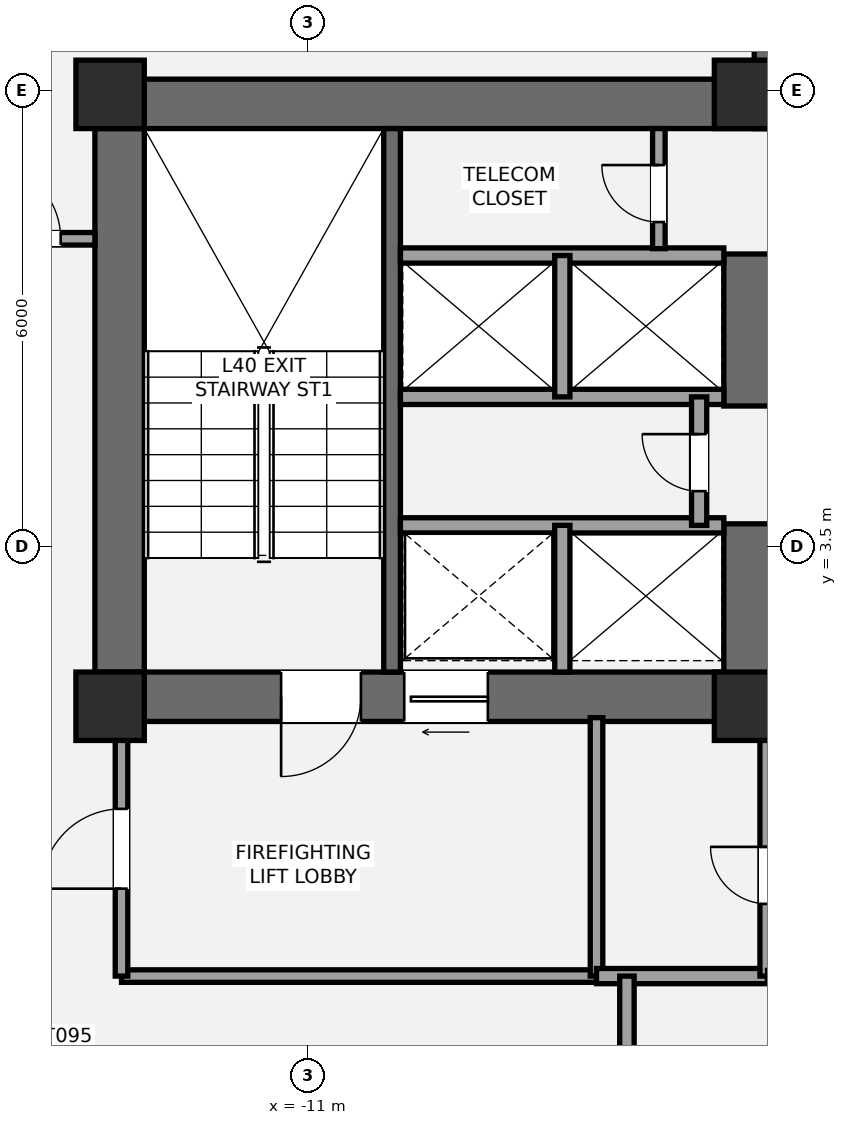
"""IFC4 building model, lengths in metres.
Left out: names, types, materials, properties, quantities, classifications, styles, units other than length and angle.
Written with IfcOpenShell. Run it as: python <this file> out.ifc"""

import sys

from ifc_helpers import new_model, si_unit, direction, frame, frame_2d, origin, origin_2d, place, context, subcontext, project, spatial, rectangle, extrude, element, fill, save


model = new_model("IFC4")
c1 = context("Model", 3, precision=1e-05, world=origin(), true_north=direction((0.0, 1.0)))
c2 = subcontext(c1, "Body", "Model", "MODEL_VIEW")
j1 = project(units=[si_unit("LENGTHUNIT", "METRE"), si_unit("PLANEANGLEUNIT", "RADIAN")], contexts=[c1])
p1 = place(None, origin())
s1 = spatial("IfcSite", under=j1, at=p1, CompositionType="ELEMENT")
p2 = place(p1, origin())
s2 = spatial("IfcBuilding", under=s1, at=p2, CompositionType="ELEMENT")
p3 = place(p2, frame((0.0, 0.0, 150.2)))
s3 = spatial("IfcBuildingStorey", under=s2, at=p3, CompositionType="ELEMENT", Elevation=150.2)
p4 = place(p3, frame((-13.475, 1.2, 0.0), z_axis=(0.0, 0.0, 1.0), x_axis=(0.0, 1.0, 0.0)))
e1 = element("IfcWall", 1, at=p4, inside=s3, PredefinedType="SHEAR", context=c2, shape_type="SweptSolid", body=[
    extrude(rectangle(XDim=8.45, YDim=0.65, at=frame_2d((4.225, 0.0))), origin(), (0.0, 0.0, 1.0), 3.2),
])
p5 = place(p3, frame((-13.8, 9.325, 0.0), z_axis=(0.0, 0.0, 1.0), x_axis=(1.0, 0.0, 0.0)))
e2 = element("IfcWall", 2, at=p5, inside=s3, PredefinedType="SHEAR", context=c2, shape_type="SweptSolid", body=[
    extrude(rectangle(XDim=9.325, YDim=0.65, at=frame_2d((4.663, 0.0))), origin(), (0.0, 0.0, 1.0), 3.2),
])
p6 = place(p3, frame((-4.875, 1.525, 0.0), z_axis=(0.0, 0.0, 1.0), x_axis=(-1.0, 0.0, 0.0)))
e3 = element("IfcWall", 3, at=p6, inside=s3, PredefinedType="SHEAR", context=c2, shape_type="SweptSolid", body=[
    extrude(rectangle(XDim=8.925, YDim=0.65, at=frame_2d((4.462, 0.0))), origin(), (0.0, 0.0, 1.0), 3.2),
])
p7 = place(p6, frame((5.425, 0.0, 0.0)))
e4 = element("IfcOpeningElement", 4, at=p7, cuts=e3, PredefinedType="OPENING", context=c2, shape_type="SweptSolid", body=[
    extrude(rectangle(XDim=1.05, YDim=2.15, at=frame_2d((0.525, 1.075))), frame((0.0, 0.335, 0.0), z_axis=(0.0, -1.0, 0.0), x_axis=(1.0, 0.0, 0.0)), (0.0, 0.0, 1.0), 0.67),
])
p8 = place(p6, frame((3.755, 0.0, 0.0)))
e5 = element("IfcOpeningElement", 5, at=p8, cuts=e3, PredefinedType="OPENING", context=c2, shape_type="SweptSolid", body=[
    extrude(rectangle(XDim=1.1, YDim=2.2, at=frame_2d((0.55, 1.1))), frame((0.0, 0.335, 0.0), z_axis=(0.0, -1.0, 0.0), x_axis=(1.0, 0.0, 0.0)), (0.0, 0.0, 1.0), 0.67),
])
p9 = place(p3, frame((-5.2, 1.2, 0.0), z_axis=(0.0, 0.0, 1.0), x_axis=(0.0, 1.0, 0.0)))
e6 = element("IfcWall", 6, at=p9, inside=s3, PredefinedType="SHEAR", context=c2, shape_type="SweptSolid", body=[
    extrude(rectangle(XDim=2.6, YDim=0.65, at=frame_2d((1.3, 0.0))), origin(), (0.0, 0.0, 1.0), 3.2),
])
p10 = place(p3, frame((-5.2, 5.35, 0.0), z_axis=(0.0, 0.0, 1.0), x_axis=(0.0, 1.0, 0.0)))
e7 = element("IfcWall", 7, at=p10, inside=s3, PredefinedType="SHEAR", context=c2, shape_type="SweptSolid", body=[
    extrude(rectangle(XDim=2.0, YDim=0.65, at=frame_2d((1.0, 0.0))), origin(), (0.0, 0.0, 1.0), 3.2),
])
p11 = place(p3, frame((-9.89, 1.85, 0.0), z_axis=(0.0, 0.0, 1.0), x_axis=(0.0, 1.0, 0.0)))
e8 = element("IfcWall", 8, at=p11, inside=s3, PredefinedType="SHEAR", context=c2, shape_type="SweptSolid", body=[
    extrude(rectangle(XDim=7.15, YDim=0.22, at=frame_2d((3.575, 0.0))), origin(), (0.0, 0.0, 1.0), 3.2),
])
p12 = place(p3, frame((-4.8, 9.0, 0.0), z_axis=(0.0, 0.0, 1.0), x_axis=(0.0, 1.0, 0.0)))
e9 = element("IfcWall", 9, at=p12, inside=s3, PredefinedType="SHEAR", context=c2, shape_type="SweptSolid", body=[
    extrude(rectangle(XDim=4.05, YDim=0.65, at=frame_2d((2.025, 0.0))), origin(), (0.0, 0.0, 1.0), 3.2),
])
for number, where, z_axis, x_axis in (
    (10, (-13.6, 1.4, 0.0), (0.0, 0.0, 1.0), (1.0, 0.0, 0.0)),
    (11, (-13.6, 9.45, 0.0), (0.0, 0.0, 1.0), (1.0, 0.0, 0.0)),
    (12, (-5.2, 1.4, 0.0), (0.0, 0.0, 1.0), (1.0, 0.0, 0.0)),
    (13, (-5.2, 9.45, 0.0), (0.0, 0.0, 1.0), (1.0, 0.0, 0.0)),
):
    element("IfcColumn", number, at=place(p3, frame(where, z_axis=z_axis, x_axis=x_axis)), inside=s3, PredefinedType="COLUMN", context=c2, shape_type="SweptSolid", body=[
        extrude(rectangle(XDim=0.9, YDim=0.9, at=origin_2d()), origin(), (0.0, 0.0, 1.0), 3.2),
    ])
p13 = place(p3, frame((-13.45, -2.15, 0.0), z_axis=(0.0, 0.0, 1.0), x_axis=(1.0, 0.0, 0.0)))
e14 = element("IfcWall", 14, at=p13, inside=s3, PredefinedType="PARTITIONING", context=c2, shape_type="SweptSolid", body=[
    extrude(rectangle(XDim=6.25, YDim=0.165, at=frame_2d((3.125, 0.0))), origin(), (0.0, 0.0, 1.0), 2.473),
])
p14 = place(p3, frame((-13.45, -2.15, 0.0), z_axis=(0.0, 0.0, 1.0), x_axis=(0.0, 1.0, 0.0)))
e15 = element("IfcWall", 15, at=p14, inside=s3, PredefinedType="PARTITIONING", context=c2, shape_type="SweptSolid", body=[
    extrude(rectangle(XDim=3.4, YDim=0.165, at=frame_2d((1.7, 0.0))), origin(), (0.0, 0.0, 1.0), 2.473),
])
p15 = place(p14, frame((1.15, 0.0, 0.0)))
e16 = element("IfcOpeningElement", 16, at=p15, cuts=e15, PredefinedType="OPENING", context=c2, shape_type="SweptSolid", body=[
    extrude(rectangle(XDim=1.05, YDim=2.15, at=frame_2d((0.525, 1.075))), frame((0.0, 0.093, 0.0), z_axis=(0.0, -1.0, 0.0), x_axis=(1.0, 0.0, 0.0)), (0.0, 0.0, 1.0), 0.185),
])
p16 = place(p3, frame((-7.2, -2.15, 0.0), z_axis=(0.0, 0.0, 1.0), x_axis=(0.0, 1.0, 0.0)))
e17 = element("IfcWall", 17, at=p16, inside=s3, PredefinedType="PARTITIONING", context=c2, shape_type="SweptSolid", body=[
    extrude(rectangle(XDim=3.4, YDim=0.165, at=frame_2d((1.7, 0.0))), origin(), (0.0, 0.0, 1.0), 2.473),
])
p17 = place(p3, frame((-7.2, -2.15, 0.0), z_axis=(0.0, 0.0, 1.0), x_axis=(1.0, 0.0, 0.0)))
e18 = element("IfcWall", 18, at=p17, inside=s3, PredefinedType="SOLIDWALL", context=c2, shape_type="SweptSolid", body=[
    extrude(rectangle(XDim=2.25, YDim=0.2, at=frame_2d((1.125, 0.0))), origin(), (0.0, 0.0, 1.0), 3.02),
])
p18 = place(p3, frame((-4.95, -2.15, 0.0), z_axis=(0.0, 0.0, 1.0), x_axis=(0.0, 1.0, 0.0)))
e19 = element("IfcWall", 19, at=p18, inside=s3, PredefinedType="SOLIDWALL", context=c2, shape_type="SweptSolid", body=[
    extrude(rectangle(XDim=3.4, YDim=0.2, at=frame_2d((1.7, 0.0))), origin(), (0.0, 0.0, 1.0), 2.473),
])
p19 = place(p18, frame((0.95, 0.0, 0.0)))
e20 = element("IfcOpeningElement", 20, at=p19, cuts=e19, PredefinedType="OPENING", context=c2, shape_type="SweptSolid", body=[
    extrude(rectangle(XDim=0.75, YDim=2.1, at=frame_2d((0.375, 1.05))), frame((0.0, 0.11, 0.0), z_axis=(0.0, -1.0, 0.0), x_axis=(1.0, 0.0, 0.0)), (0.0, 0.0, 1.0), 0.22),
])
p20 = place(p3, frame((-9.78, 3.78, 0.0), z_axis=(0.0, 0.0, 1.0), x_axis=(1.0, 0.0, 0.0)))
e21 = element("IfcWall", 21, at=p20, inside=s3, PredefinedType="SOLIDWALL", context=c2, shape_type="SweptSolid", body=[
    extrude(rectangle(XDim=4.255, YDim=0.2, at=frame_2d((2.127, 0.0))), origin(), (0.0, 0.0, 1.0), 3.02),
])
p21 = place(p3, frame((-7.65, 1.85, 0.0), z_axis=(0.0, 0.0, 1.0), x_axis=(0.0, 1.0, 0.0)))
e22 = element("IfcWall", 22, at=p21, inside=s3, PredefinedType="SOLIDWALL", context=c2, shape_type="SweptSolid", body=[
    extrude(rectangle(XDim=1.93, YDim=0.2, at=frame_2d((0.965, 0.0))), origin(), (0.0, 0.0, 1.0), 3.02),
])
for number, where, z_axis, x_axis in (
    (23, (-9.78, 5.47, 0.0), (0.0, 0.0, 1.0), (1.0, 0.0, 0.0)),
    (24, (-9.78, 7.33, 0.0), (0.0, 0.0, 1.0), (1.0, 0.0, 0.0)),
):
    element("IfcWall", number, at=place(p3, frame(where, z_axis=z_axis, x_axis=x_axis)), inside=s3, PredefinedType="SOLIDWALL", context=c2, shape_type="SweptSolid", body=[
        extrude(rectangle(XDim=4.255, YDim=0.2, at=frame_2d((2.127, 0.0))), origin(), (0.0, 0.0, 1.0), 3.02),
    ])
p22 = place(p3, frame((-7.65, 5.47, 0.0), z_axis=(0.0, 0.0, 1.0), x_axis=(0.0, 1.0, 0.0)))
e25 = element("IfcWall", 25, at=p22, inside=s3, PredefinedType="SOLIDWALL", context=c2, shape_type="SweptSolid", body=[
    extrude(rectangle(XDim=1.86, YDim=0.2, at=frame_2d((0.93, 0.0))), origin(), (0.0, 0.0, 1.0), 3.02),
])
p23 = place(p3, frame((-5.85, 3.78, 0.0), z_axis=(0.0, 0.0, 1.0), x_axis=(0.0, 1.0, 0.0)))
e26 = element("IfcWall", 26, at=p23, inside=s3, PredefinedType="SOLIDWALL", context=c2, shape_type="SweptSolid", body=[
    extrude(rectangle(XDim=1.69, YDim=0.2, at=frame_2d((0.845, 0.0))), origin(), (0.0, 0.0, 1.0), 3.02),
])
p24 = place(p23, frame((0.45, 0.0, 0.0)))
e27 = element("IfcOpeningElement", 27, at=p24, cuts=e26, PredefinedType="OPENING", context=c2, shape_type="SweptSolid", body=[
    extrude(rectangle(XDim=0.75, YDim=2.1, at=frame_2d((0.375, 1.05))), frame((0.0, 0.11, 0.0), z_axis=(0.0, -1.0, 0.0), x_axis=(1.0, 0.0, 0.0)), (0.0, 0.0, 1.0), 0.22),
])
p25 = place(p3, frame((-6.38, 7.42, 0.0), z_axis=(0.0, 0.0, 1.0), x_axis=(0.0, 1.0, 0.0)))
e28 = element("IfcWall", 28, at=p25, inside=s3, PredefinedType="PARTITIONING", context=c2, shape_type="SweptSolid", body=[
    extrude(rectangle(XDim=1.58, YDim=0.165, at=frame_2d((0.79, 0.0))), origin(), (0.0, 0.0, 1.0), 3.02),
])
p26 = place(p25, frame((0.35, 0.0, 0.0)))
e29 = element("IfcOpeningElement", 29, at=p26, cuts=e28, PredefinedType="OPENING", context=c2, shape_type="SweptSolid", body=[
    extrude(rectangle(XDim=0.75, YDim=2.1, at=frame_2d((0.375, 1.05))), frame((0.0, 0.093, 0.0), z_axis=(0.0, -1.0, 0.0), x_axis=(1.0, 0.0, 0.0)), (0.0, 0.0, 1.0), 0.185),
])
p27 = place(p3, frame((-6.8, -4.05, 0.0), z_axis=(0.0, 0.0, 1.0), x_axis=(0.0, 1.0, 0.0)))
e30 = element("IfcWall", 30, at=p27, inside=s3, PredefinedType="PLUMBINGWALL", context=c2, shape_type="SweptSolid", body=[
    extrude(rectangle(XDim=1.9, YDim=0.19, at=frame_2d((0.95, 0.0))), origin(), (0.0, 0.0, 1.0), 3.02),
])
p28 = place(p3, frame((-15.55, 7.55, 0.0), z_axis=(0.0, 0.0, 1.0), x_axis=(1.0, 0.0, 0.0)))
e31 = element("IfcWall", 31, at=p28, inside=s3, PredefinedType="PARTITIONING", context=c2, shape_type="SweptSolid", body=[
    extrude(rectangle(XDim=1.75, YDim=0.165, at=frame_2d((0.875, 0.0))), origin(), (0.0, 0.0, 1.0), 3.02),
])
p29 = place(p28, frame((0.3, 0.0, 0.0)))
e32 = element("IfcOpeningElement", 32, at=p29, cuts=e31, PredefinedType="OPENING", context=c2, shape_type="SweptSolid", body=[
    extrude(rectangle(XDim=1.0, YDim=2.15, at=frame_2d((0.5, 1.075))), frame((0.0, 0.093, 0.0), z_axis=(0.0, -1.0, 0.0), x_axis=(1.0, 0.0, 0.0)), (0.0, 0.0, 1.0), 0.185),
])
p30 = place(p7, origin())
e33 = element("IfcDoor", 33, at=p30, inside=s3, OperationType="SINGLE_SWING_RIGHT", PredefinedType="DOOR", context=c2, shape_type="SweptSolid", body=[
    extrude(rectangle(XDim=1.05, YDim=2.15, at=frame_2d((0.525, 1.075))), frame((0.0, 0.025, 0.0), z_axis=(0.0, -1.0, 0.0), x_axis=(1.0, 0.0, 0.0)), (0.0, 0.0, 1.0), 0.05),
])
fill(e4, e33)
p31 = place(p15, origin())
e34 = element("IfcDoor", 34, at=p31, inside=s3, OperationType="SINGLE_SWING_LEFT", PredefinedType="DOOR", context=c2, shape_type="SweptSolid", body=[
    extrude(rectangle(XDim=1.05, YDim=2.15, at=frame_2d((0.525, 1.075))), frame((0.0, 0.025, 0.0), z_axis=(0.0, -1.0, 0.0), x_axis=(1.0, 0.0, 0.0)), (0.0, 0.0, 1.0), 0.05),
])
fill(e16, e34)
p32 = place(p19, origin())
e35 = element("IfcDoor", 35, at=p32, inside=s3, OperationType="SINGLE_SWING_RIGHT", PredefinedType="DOOR", context=c2, shape_type="SweptSolid", body=[
    extrude(rectangle(XDim=0.75, YDim=2.1, at=frame_2d((0.375, 1.05))), frame((0.0, 0.025, 0.0), z_axis=(0.0, -1.0, 0.0), x_axis=(1.0, 0.0, 0.0)), (0.0, 0.0, 1.0), 0.05),
])
fill(e20, e35)
p33 = place(p8, origin())
e36 = element("IfcDoor", 36, at=p33, inside=s3, OperationType="SLIDING_TO_LEFT", PredefinedType="DOOR", context=c2, shape_type="SweptSolid", body=[
    extrude(rectangle(XDim=1.1, YDim=2.2, at=frame_2d((0.55, 1.1))), frame((0.0, 0.025, 0.0), z_axis=(0.0, -1.0, 0.0), x_axis=(1.0, 0.0, 0.0)), (0.0, 0.0, 1.0), 0.05),
])
fill(e5, e36)
p34 = place(p24, origin())
e37 = element("IfcDoor", 37, at=p34, inside=s3, OperationType="SINGLE_SWING_RIGHT", PredefinedType="DOOR", context=c2, shape_type="SweptSolid", body=[
    extrude(rectangle(XDim=0.75, YDim=2.1, at=frame_2d((0.375, 1.05))), frame((0.0, 0.025, 0.0), z_axis=(0.0, -1.0, 0.0), x_axis=(1.0, 0.0, 0.0)), (0.0, 0.0, 1.0), 0.05),
])
fill(e27, e37)
p35 = place(p26, origin())
e38 = element("IfcDoor", 38, at=p35, inside=s3, OperationType="SINGLE_SWING_RIGHT", PredefinedType="DOOR", context=c2, shape_type="SweptSolid", body=[
    extrude(rectangle(XDim=0.75, YDim=2.1, at=frame_2d((0.375, 1.05))), frame((0.0, 0.025, 0.0), z_axis=(0.0, -1.0, 0.0), x_axis=(1.0, 0.0, 0.0)), (0.0, 0.0, 1.0), 0.05),
])
fill(e29, e38)
p36 = place(p29, origin())
e39 = element("IfcDoor", 39, at=p36, inside=s3, OperationType="SINGLE_SWING_LEFT", PredefinedType="DOOR", context=c2, shape_type="SweptSolid", body=[
    extrude(rectangle(XDim=1.0, YDim=2.15, at=frame_2d((0.5, 1.075))), frame((0.0, 0.025, 0.0), z_axis=(0.0, -1.0, 0.0), x_axis=(1.0, 0.0, 0.0)), (0.0, 0.0, 1.0), 0.05),
])
fill(e32, e39)
save(model, sys.argv[1])
